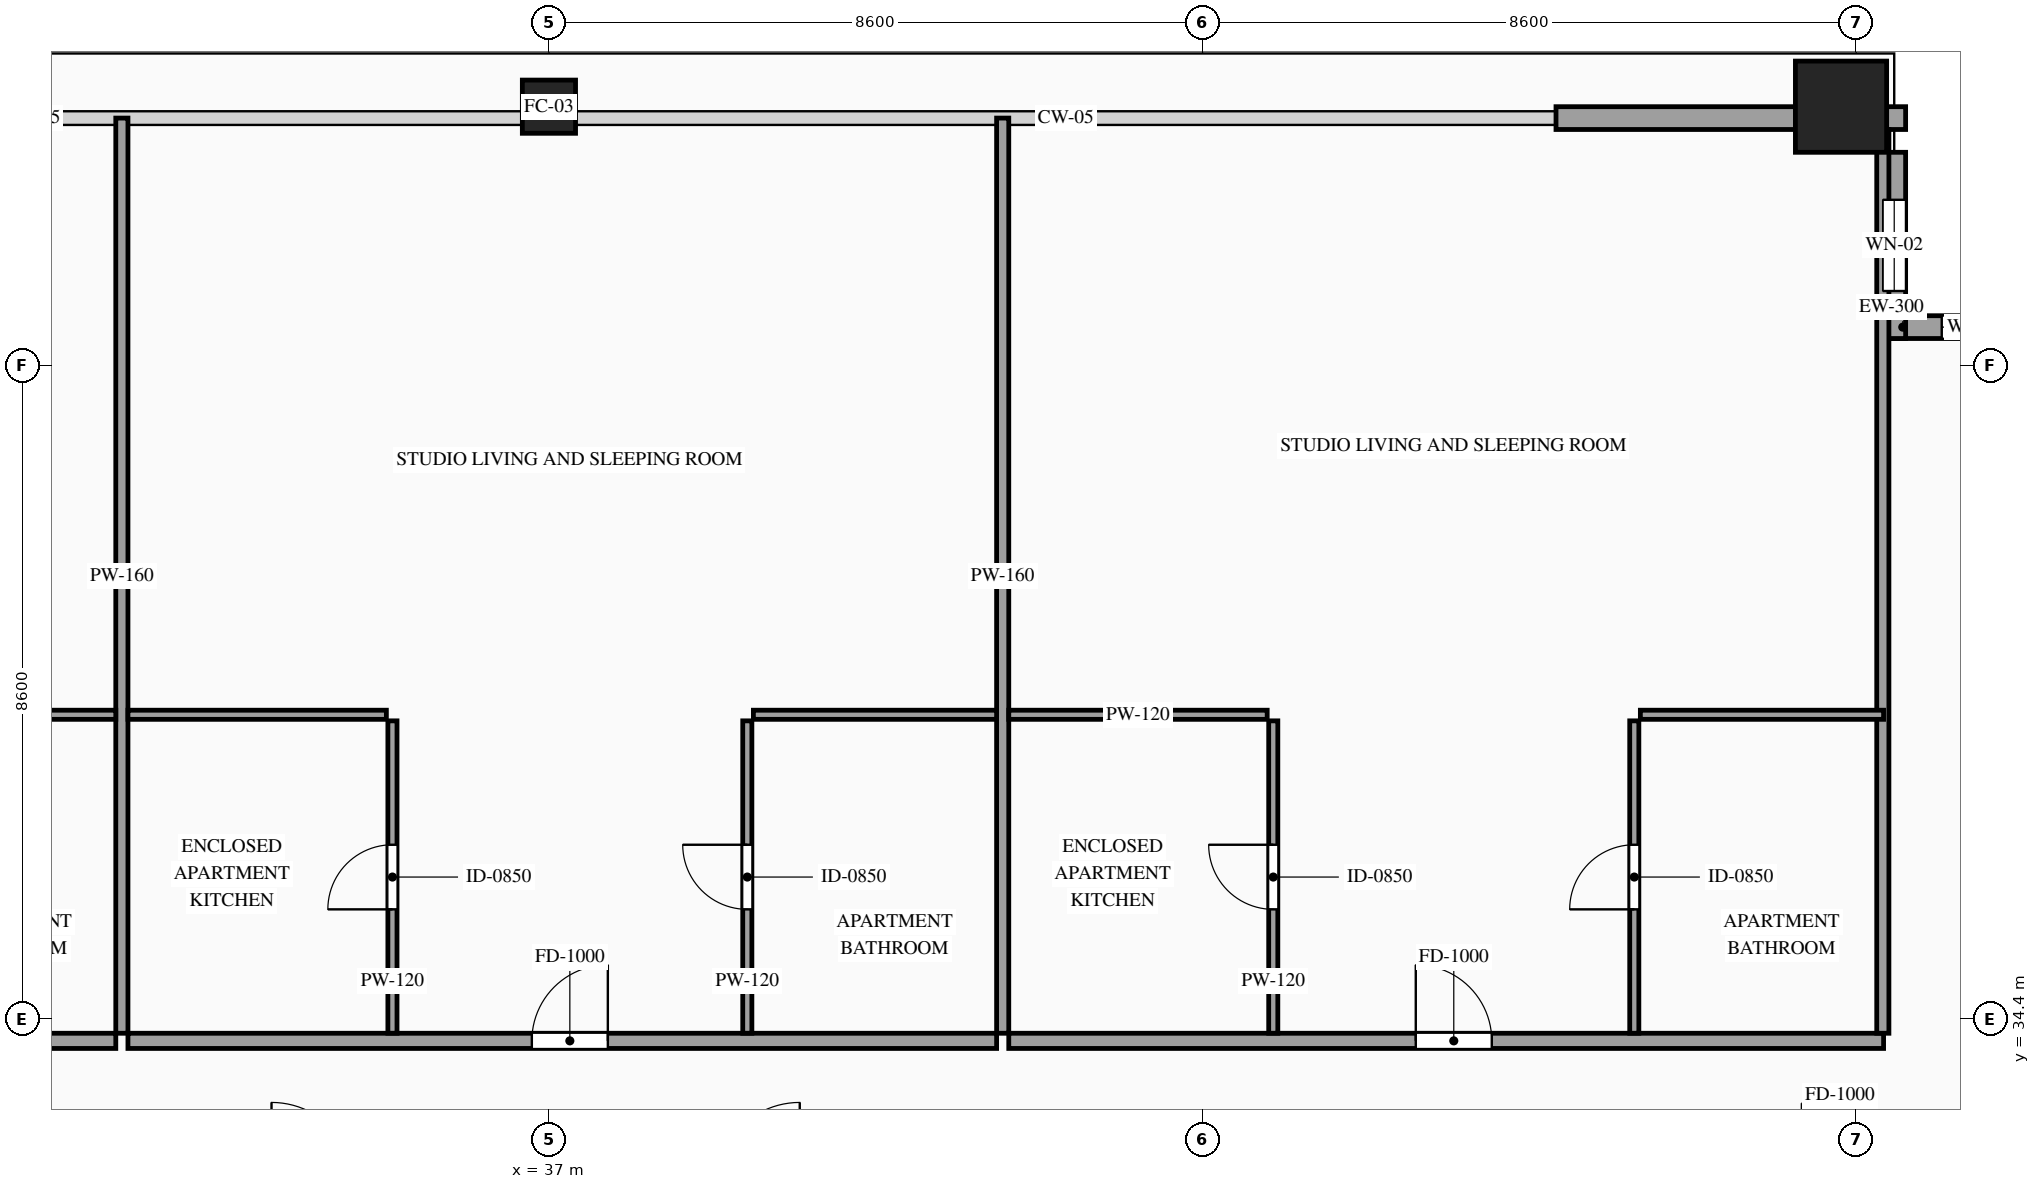
"""IFC4 building model, lengths in metres.
Left out: names, types, materials, properties, quantities, classifications, styles, units other than length and angle.
Written with IfcOpenShell. Run it as: python <this file> out.ifc"""

import sys

from ifc_helpers import new_model, si_unit, direction, frame, frame_2d, origin, origin_2d, place, context, subcontext, project, spatial, rectangle, hollow_rectangle, extrude, source, transform, mapped, element, fill, save


model = new_model("IFC4")
c1 = context("Model", 3, precision=1e-05, world=origin(), true_north=direction((0.0, 1.0)))
c2 = subcontext(c1, "Body", "Model", "MODEL_VIEW")
j1 = project(units=[si_unit("LENGTHUNIT", "METRE"), si_unit("PLANEANGLEUNIT", "RADIAN")], contexts=[c1])
p1 = place(None, origin())
s1 = spatial("IfcSite", under=j1, at=p1, CompositionType="ELEMENT")
p2 = place(p1, origin())
s2 = spatial("IfcBuilding", under=s1, at=p2, CompositionType="ELEMENT")
p3 = place(p2, frame((0.0, 0.0, 241.6)))
s3 = spatial("IfcBuildingStorey", under=s2, at=p3, CompositionType="ELEMENT", Elevation=241.6)
m1 = source(origin(), c2, "Body", "SweptSolid", [
    extrude(hollow_rectangle(XDim=0.7, YDim=0.7, WallThickness=0.032, at=origin_2d()), origin(), (0.0, 0.0, 1.0), 3.5),
])
p4 = place(p3, frame((37.0, 46.4, 0.0), z_axis=(0.0, 0.0, 1.0), x_axis=(1.0, 0.0, 0.0)))
e1 = element("IfcColumn", 1, at=p4, inside=s3, PredefinedType="COLUMN", context=c2, shape_type="MappedRepresentation", body=[
    mapped(m1, transform((0.0, 0.0, 0.0), scale=1.0)),
])
m2 = source(origin(), c2, "Body", "SweptSolid", [
    extrude(hollow_rectangle(XDim=1.2, YDim=1.2, WallThickness=0.055, at=origin_2d()), origin(), (0.0, 0.0, 1.0), 3.5),
])
p5 = place(p3, frame((54.0, 46.4, 0.0), z_axis=(0.0, 0.0, 1.0), x_axis=(1.0, 0.0, 0.0)))
e2 = element("IfcColumn", 2, at=p5, inside=s3, PredefinedType="COLUMN", context=c2, shape_type="MappedRepresentation", body=[
    mapped(m2, transform((0.0, 0.0, 0.0), scale=1.0)),
])
p6 = place(p3, frame((57.0, 43.5, 0.0), z_axis=(0.0, 0.0, 1.0), x_axis=(-1.0, 0.0, 0.0)))
e3 = element("IfcWall", 3, at=p6, inside=s3, PredefinedType="SOLIDWALL", context=c2, shape_type="SweptSolid", body=[
    extrude(rectangle(XDim=2.45, YDim=0.3, at=frame_2d((1.225, 0.0))), origin(), (0.0, 0.0, 1.0), 3.28),
])
p7 = place(p6, frame((0.775, 0.0, 0.85)))
e4 = element("IfcOpeningElement", 4, at=p7, cuts=e3, PredefinedType="OPENING", context=c2, shape_type="SweptSolid", body=[
    extrude(rectangle(XDim=0.9, YDim=1.5, at=frame_2d((0.45, 0.75))), frame((0.0, 0.165, 0.0), z_axis=(0.0, -1.0, 0.0), x_axis=(1.0, 0.0, 0.0)), (0.0, 0.0, 1.0), 0.33),
])
p8 = place(p3, frame((54.7, 43.35, 0.0), z_axis=(0.0, 0.0, 1.0), x_axis=(0.0, 1.0, 0.0)))
e5 = element("IfcWall", 5, at=p8, inside=s3, PredefinedType="SOLIDWALL", context=c2, shape_type="SweptSolid", body=[
    extrude(rectangle(XDim=2.45, YDim=0.3, at=frame_2d((1.225, 0.0))), origin(), (0.0, 0.0, 1.0), 3.28),
])
p9 = place(p8, frame((0.625, 0.0, 0.85)))
e6 = element("IfcOpeningElement", 6, at=p9, cuts=e5, PredefinedType="OPENING", context=c2, shape_type="SweptSolid", body=[
    extrude(rectangle(XDim=1.2, YDim=2.1, at=frame_2d((0.6, 1.05))), frame((0.0, 0.165, 0.0), z_axis=(0.0, -1.0, 0.0), x_axis=(1.0, 0.0, 0.0)), (0.0, 0.0, 1.0), 0.33),
])
m3 = source(origin(), c2, "Body", "SweptSolid", [
    extrude(rectangle(XDim=0.25, YDim=0.3, at=frame_2d((0.125, 0.0))), origin(), (0.0, 0.0, 1.0), 3.28),
])
p10 = place(p3, frame((54.6, 46.25, 0.0), z_axis=(0.0, 0.0, 1.0), x_axis=(1.0, 0.0, 0.0)))
e7 = element("IfcWall", 7, at=p10, inside=s3, PredefinedType="SOLIDWALL", context=c2, shape_type="MappedRepresentation", body=[
    mapped(m3, transform((0.0, 0.0, 0.0), scale=1.0)),
])
m4 = source(origin(), c2, "Body", "SweptSolid", [
    extrude(rectangle(XDim=3.15, YDim=0.3, at=frame_2d((1.575, 0.0))), origin(), (0.0, 0.0, 1.0), 2.835),
])
p11 = place(p3, frame((50.25, 46.25, 0.0), z_axis=(0.0, 0.0, 1.0), x_axis=(1.0, 0.0, 0.0)))
e8 = element("IfcWall", 8, at=p11, inside=s3, PredefinedType="SOLIDWALL", context=c2, shape_type="MappedRepresentation", body=[
    mapped(m4, transform((0.0, 0.0, 0.0), scale=1.0)),
])
p12 = place(p3, frame((19.44, 34.11, 0.0), z_axis=(0.0, 0.0, 1.0), x_axis=(1.0, 0.0, 0.0)))
e9 = element("IfcWall", 9, at=p12, inside=s3, PredefinedType="PARTITIONING", context=c2, shape_type="SweptSolid", body=[
    extrude(rectangle(XDim=11.861, YDim=0.2, at=frame_2d((5.931, 0.0))), origin(), (0.0, 0.0, 1.0), 3.28),
])
p13 = place(p12, frame((5.531, 0.0, 0.0)))
e10 = element("IfcOpeningElement", 10, at=p13, cuts=e9, PredefinedType="OPENING", context=c2, shape_type="SweptSolid", body=[
    extrude(rectangle(XDim=1.0, YDim=2.2, at=frame_2d((0.5, 1.1))), frame((0.0, 0.115, 0.0), z_axis=(0.0, -1.0, 0.0), x_axis=(1.0, 0.0, 0.0)), (0.0, 0.0, 1.0), 0.23),
])
m5 = source(origin(), c2, "Body", "SweptSolid", [
    extrude(rectangle(XDim=12.04, YDim=0.16, at=frame_2d((6.02, 0.0))), origin(), (0.0, 0.0, 1.0), 3.28),
])
p14 = place(p3, frame((31.381, 34.21, 0.0), z_axis=(0.0, 0.0, 1.0), x_axis=(0.0, 1.0, 0.0)))
e11 = element("IfcWall", 11, at=p14, inside=s3, PredefinedType="PARTITIONING", context=c2, shape_type="MappedRepresentation", body=[
    mapped(m5, transform((0.0, 0.0, 0.0), scale=1.0)),
])
m6 = source(origin(), c2, "Body", "SweptSolid", [
    extrude(rectangle(XDim=3.2, YDim=0.12, at=frame_2d((1.6, 0.0))), origin(), (0.0, 0.0, 1.0), 3.28),
])
p15 = place(p3, frame((28.101, 38.4, 0.0), z_axis=(0.0, 0.0, 1.0), x_axis=(1.0, 0.0, 0.0)))
e12 = element("IfcWall", 12, at=p15, inside=s3, PredefinedType="PARTITIONING", context=c2, shape_type="MappedRepresentation", body=[
    mapped(m6, transform((0.0, 0.0, 0.0), scale=1.0)),
])
p16 = place(p3, frame((31.461, 34.11, 0.0), z_axis=(0.0, 0.0, 1.0), x_axis=(1.0, 0.0, 0.0)))
e13 = element("IfcWall", 13, at=p16, inside=s3, PredefinedType="PARTITIONING", context=c2, shape_type="SweptSolid", body=[
    extrude(rectangle(XDim=11.429, YDim=0.2, at=frame_2d((5.714, 0.0))), origin(), (0.0, 0.0, 1.0), 3.28),
])
p17 = place(p16, frame((5.314, 0.0, 0.0)))
e14 = element("IfcOpeningElement", 14, at=p17, cuts=e13, PredefinedType="OPENING", context=c2, shape_type="SweptSolid", body=[
    extrude(rectangle(XDim=1.0, YDim=2.2, at=frame_2d((0.5, 1.1))), frame((0.0, 0.115, 0.0), z_axis=(0.0, -1.0, 0.0), x_axis=(1.0, 0.0, 0.0)), (0.0, 0.0, 1.0), 0.23),
])
p18 = place(p3, frame((42.97, 34.21, 0.0), z_axis=(0.0, 0.0, 1.0), x_axis=(0.0, 1.0, 0.0)))
e15 = element("IfcWall", 15, at=p18, inside=s3, PredefinedType="PARTITIONING", context=c2, shape_type="MappedRepresentation", body=[
    mapped(m5, transform((0.0, 0.0, 0.0), scale=1.0)),
])
m7 = source(origin(), c2, "Body", "SweptSolid", [
    extrude(rectangle(XDim=3.4, YDim=0.12, at=frame_2d((1.7, 0.0))), origin(), (0.0, 0.0, 1.0), 3.28),
])
p19 = place(p3, frame((31.461, 38.4, 0.0), z_axis=(0.0, 0.0, 1.0), x_axis=(1.0, 0.0, 0.0)))
e16 = element("IfcWall", 16, at=p19, inside=s3, PredefinedType="PARTITIONING", context=c2, shape_type="MappedRepresentation", body=[
    mapped(m7, transform((0.0, 0.0, 0.0), scale=1.0)),
])
p20 = place(p3, frame((34.941, 34.21, 0.0), z_axis=(0.0, 0.0, 1.0), x_axis=(0.0, 1.0, 0.0)))
e17 = element("IfcWall", 17, at=p20, inside=s3, PredefinedType="PARTITIONING", context=c2, shape_type="SweptSolid", body=[
    extrude(rectangle(XDim=4.11, YDim=0.12, at=frame_2d((2.055, 0.0))), origin(), (0.0, 0.0, 1.0), 3.28),
])
p21 = place(p20, frame((1.63, 0.0, 0.0)))
e18 = element("IfcOpeningElement", 18, at=p21, cuts=e17, PredefinedType="OPENING", context=c2, shape_type="SweptSolid", body=[
    extrude(rectangle(XDim=0.85, YDim=2.1, at=frame_2d((0.425, 1.05))), frame((0.0, 0.075, 0.0), z_axis=(0.0, -1.0, 0.0), x_axis=(1.0, 0.0, 0.0)), (0.0, 0.0, 1.0), 0.15),
])
p22 = place(p3, frame((39.69, 38.4, 0.0), z_axis=(0.0, 0.0, 1.0), x_axis=(1.0, 0.0, 0.0)))
e19 = element("IfcWall", 19, at=p22, inside=s3, PredefinedType="PARTITIONING", context=c2, shape_type="MappedRepresentation", body=[
    mapped(m6, transform((0.0, 0.0, 0.0), scale=1.0)),
])
p23 = place(p3, frame((39.61, 34.21, 0.0), z_axis=(0.0, 0.0, 1.0), x_axis=(0.0, 1.0, 0.0)))
e20 = element("IfcWall", 20, at=p23, inside=s3, PredefinedType="PARTITIONING", context=c2, shape_type="SweptSolid", body=[
    extrude(rectangle(XDim=4.11, YDim=0.12, at=frame_2d((2.055, 0.0))), origin(), (0.0, 0.0, 1.0), 3.28),
])
p24 = place(p23, frame((1.63, 0.0, 0.0)))
e21 = element("IfcOpeningElement", 21, at=p24, cuts=e20, PredefinedType="OPENING", context=c2, shape_type="SweptSolid", body=[
    extrude(rectangle(XDim=0.85, YDim=2.1, at=frame_2d((0.425, 1.05))), frame((0.0, 0.075, 0.0), z_axis=(0.0, -1.0, 0.0), x_axis=(1.0, 0.0, 0.0)), (0.0, 0.0, 1.0), 0.15),
])
p25 = place(p3, frame((43.05, 34.11, 0.0), z_axis=(0.0, 0.0, 1.0), x_axis=(1.0, 0.0, 0.0)))
e22 = element("IfcWall", 22, at=p25, inside=s3, PredefinedType="PARTITIONING", context=c2, shape_type="SweptSolid", body=[
    extrude(rectangle(XDim=11.51, YDim=0.2, at=frame_2d((5.755, 0.0))), origin(), (0.0, 0.0, 1.0), 3.28),
])
p26 = place(p25, frame((5.355, 0.0, 0.0)))
e23 = element("IfcOpeningElement", 23, at=p26, cuts=e22, PredefinedType="OPENING", context=c2, shape_type="SweptSolid", body=[
    extrude(rectangle(XDim=1.0, YDim=2.2, at=frame_2d((0.5, 1.1))), frame((0.0, 0.115, 0.0), z_axis=(0.0, -1.0, 0.0), x_axis=(1.0, 0.0, 0.0)), (0.0, 0.0, 1.0), 0.23),
])
m8 = source(origin(), c2, "Body", "SweptSolid", [
    extrude(rectangle(XDim=11.89, YDim=0.16, at=frame_2d((5.945, 0.0))), origin(), (0.0, 0.0, 1.0), 3.28),
])
p27 = place(p3, frame((54.55, 34.21, 0.0), z_axis=(0.0, 0.0, 1.0), x_axis=(0.0, 1.0, 0.0)))
e24 = element("IfcWall", 24, at=p27, inside=s3, PredefinedType="PARTITIONING", context=c2, shape_type="MappedRepresentation", body=[
    mapped(m8, transform((0.0, 0.0, 0.0), scale=1.0)),
])
m9 = source(origin(), c2, "Body", "SweptSolid", [
    extrude(rectangle(XDim=3.4, YDim=0.12, at=frame_2d((1.7, 0.0))), origin(), (0.0, 0.0, 1.0), 3.28),
])
p28 = place(p3, frame((43.05, 38.4, 0.0), z_axis=(0.0, 0.0, 1.0), x_axis=(1.0, 0.0, 0.0)))
e25 = element("IfcWall", 25, at=p28, inside=s3, PredefinedType="PARTITIONING", context=c2, shape_type="MappedRepresentation", body=[
    mapped(m9, transform((0.0, 0.0, 0.0), scale=1.0)),
])
p29 = place(p3, frame((46.53, 34.21, 0.0), z_axis=(0.0, 0.0, 1.0), x_axis=(0.0, 1.0, 0.0)))
e26 = element("IfcWall", 26, at=p29, inside=s3, PredefinedType="PARTITIONING", context=c2, shape_type="SweptSolid", body=[
    extrude(rectangle(XDim=4.11, YDim=0.12, at=frame_2d((2.055, 0.0))), origin(), (0.0, 0.0, 1.0), 3.28),
])
p30 = place(p29, frame((1.63, 0.0, 0.0)))
e27 = element("IfcOpeningElement", 27, at=p30, cuts=e26, PredefinedType="OPENING", context=c2, shape_type="SweptSolid", body=[
    extrude(rectangle(XDim=0.85, YDim=2.1, at=frame_2d((0.425, 1.05))), frame((0.0, 0.075, 0.0), z_axis=(0.0, -1.0, 0.0), x_axis=(1.0, 0.0, 0.0)), (0.0, 0.0, 1.0), 0.15),
])
p31 = place(p3, frame((51.36, 38.4, 0.0), z_axis=(0.0, 0.0, 1.0), x_axis=(1.0, 0.0, 0.0)))
e28 = element("IfcWall", 28, at=p31, inside=s3, PredefinedType="PARTITIONING", context=c2, shape_type="MappedRepresentation", body=[
    mapped(m6, transform((0.0, 0.0, 0.0), scale=1.0)),
])
p32 = place(p3, frame((51.28, 34.21, 0.0), z_axis=(0.0, 0.0, 1.0), x_axis=(0.0, 1.0, 0.0)))
e29 = element("IfcWall", 29, at=p32, inside=s3, PredefinedType="PARTITIONING", context=c2, shape_type="SweptSolid", body=[
    extrude(rectangle(XDim=4.11, YDim=0.12, at=frame_2d((2.055, 0.0))), origin(), (0.0, 0.0, 1.0), 3.28),
])
p33 = place(p32, frame((1.63, 0.0, 0.0)))
e30 = element("IfcOpeningElement", 30, at=p33, cuts=e29, PredefinedType="OPENING", context=c2, shape_type="SweptSolid", body=[
    extrude(rectangle(XDim=0.85, YDim=2.1, at=frame_2d((0.425, 1.05))), frame((0.0, 0.075, 0.0), z_axis=(0.0, -1.0, 0.0), x_axis=(1.0, 0.0, 0.0)), (0.0, 0.0, 1.0), 0.15),
])
m10 = source(origin(), c2, "Body", "SweptSolid", [
    extrude(rectangle(XDim=0.9, YDim=1.5, at=frame_2d((0.45, 0.75))), frame((0.0, 0.03, 0.0), z_axis=(0.0, -1.0, 0.0), x_axis=(1.0, 0.0, 0.0)), (0.0, 0.0, 1.0), 0.06),
])
p34 = place(p7, origin())
e31 = element("IfcWindow", 31, at=p34, inside=s3, PartitioningType="SINGLE_PANEL", PredefinedType="WINDOW", context=c2, shape_type="MappedRepresentation", body=[
    mapped(m10, transform((0.0, 0.0, 0.0), scale=1.0)),
])
fill(e4, e31)
m11 = source(origin(), c2, "Body", "SweptSolid", [
    extrude(rectangle(XDim=1.2, YDim=2.1, at=frame_2d((0.6, 1.05))), frame((0.0, 0.03, 0.0), z_axis=(0.0, -1.0, 0.0), x_axis=(1.0, 0.0, 0.0)), (0.0, 0.0, 1.0), 0.06),
])
p35 = place(p9, origin())
e32 = element("IfcWindow", 32, at=p35, inside=s3, PartitioningType="SINGLE_PANEL", PredefinedType="WINDOW", context=c2, shape_type="MappedRepresentation", body=[
    mapped(m11, transform((0.0, 0.0, 0.0), scale=1.0)),
])
fill(e6, e32)
m12 = source(origin(), c2, "Body", "SweptSolid", [
    extrude(rectangle(XDim=1.0, YDim=2.2, at=frame_2d((0.5, 1.1))), frame((0.0, 0.025, 0.0), z_axis=(0.0, -1.0, 0.0), x_axis=(1.0, 0.0, 0.0)), (0.0, 0.0, 1.0), 0.05),
])
p36 = place(p17, origin())
e33 = element("IfcDoor", 33, at=p36, inside=s3, OperationType="SINGLE_SWING_RIGHT", PredefinedType="DOOR", context=c2, shape_type="MappedRepresentation", body=[
    mapped(m12, transform((0.0, 0.0, 0.0), scale=1.0)),
])
fill(e14, e33)
m13 = source(origin(), c2, "Body", "SweptSolid", [
    extrude(rectangle(XDim=0.85, YDim=2.1, at=frame_2d((0.425, 1.05))), frame((0.0, 0.025, 0.0), z_axis=(0.0, -1.0, 0.0), x_axis=(1.0, 0.0, 0.0)), (0.0, 0.0, 1.0), 0.05),
])
p37 = place(p21, origin())
e34 = element("IfcDoor", 34, at=p37, inside=s3, OperationType="SINGLE_SWING_LEFT", PredefinedType="DOOR", context=c2, shape_type="MappedRepresentation", body=[
    mapped(m13, transform((0.0, 0.0, 0.0), scale=1.0)),
])
fill(e18, e34)
p38 = place(p24, origin())
e35 = element("IfcDoor", 35, at=p38, inside=s3, OperationType="SINGLE_SWING_RIGHT", PredefinedType="DOOR", context=c2, shape_type="MappedRepresentation", body=[
    mapped(m13, transform((0.0, 0.0, 0.0), scale=1.0)),
])
fill(e21, e35)
p39 = place(p26, origin())
e36 = element("IfcDoor", 36, at=p39, inside=s3, OperationType="SINGLE_SWING_LEFT", PredefinedType="DOOR", context=c2, shape_type="MappedRepresentation", body=[
    mapped(m12, transform((0.0, 0.0, 0.0), scale=1.0)),
])
fill(e23, e36)
p40 = place(p30, origin())
e37 = element("IfcDoor", 37, at=p40, inside=s3, OperationType="SINGLE_SWING_RIGHT", PredefinedType="DOOR", context=c2, shape_type="MappedRepresentation", body=[
    mapped(m13, transform((0.0, 0.0, 0.0), scale=1.0)),
])
fill(e27, e37)
p41 = place(p33, origin())
e38 = element("IfcDoor", 38, at=p41, inside=s3, OperationType="SINGLE_SWING_LEFT", PredefinedType="DOOR", context=c2, shape_type="MappedRepresentation", body=[
    mapped(m13, transform((0.0, 0.0, 0.0), scale=1.0)),
])
fill(e30, e38)
save(model, sys.argv[1])
